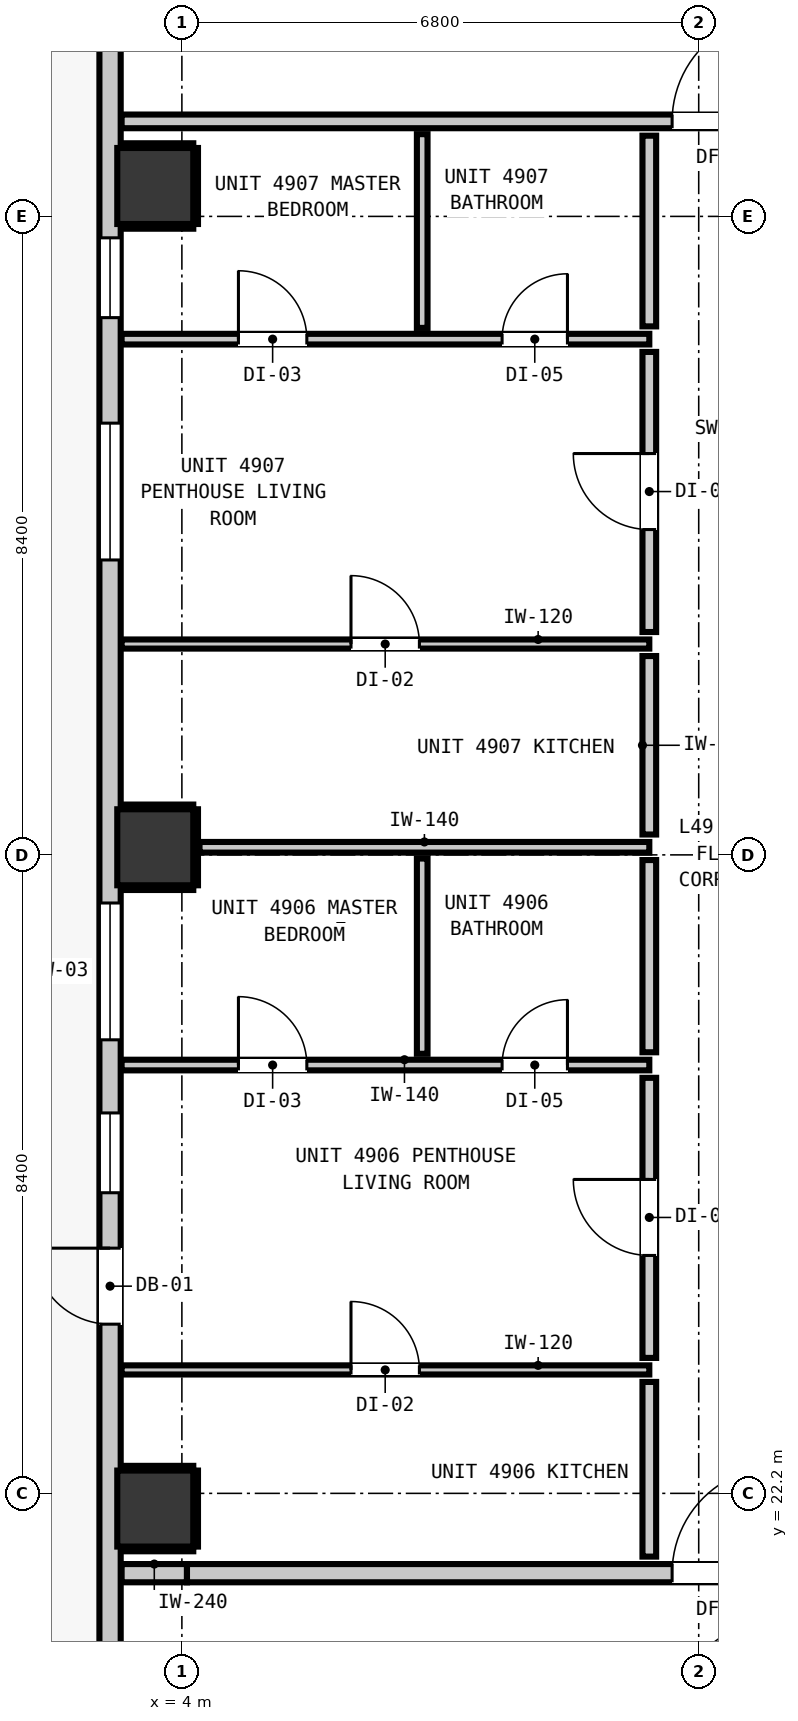
"""IFC4 building model, lengths in metres.
Left out: names, types, materials, properties, quantities, classifications, styles, units other than length and angle.
Written with IfcOpenShell. Run it as: python <this file> out.ifc"""

import sys

from ifc_helpers import new_model, si_unit, direction, frame, frame_2d, origin, origin_2d, place, context, subcontext, project, spatial, rectangle, extrude, element, fill, save


model = new_model("IFC4")
c1 = context("Model", 3, precision=1e-05, world=origin(), true_north=direction((0.0, 1.0)))
c2 = subcontext(c1, "Body", "Model", "MODEL_VIEW")
j1 = project(units=[si_unit("LENGTHUNIT", "METRE"), si_unit("PLANEANGLEUNIT", "RADIAN")], contexts=[c1])
p1 = place(None, origin())
s1 = spatial("IfcSite", under=j1, at=p1, CompositionType="ELEMENT")
p2 = place(p1, origin())
s2 = spatial("IfcBuilding", under=s1, at=p2, CompositionType="ELEMENT")
p3 = place(p2, frame((0.0, 0.0, 169.16)))
s3 = spatial("IfcBuildingStorey", under=s2, at=p3, CompositionType="ELEMENT", Elevation=169.16)
for number, where, z_axis, x_axis in (
    (1, (3.65, 22.0, 0.0), (0.0, 0.0, 1.0), (1.0, 0.0, 0.0)),
    (2, (3.65, 30.7, 0.0), (0.0, 0.0, 1.0), (1.0, 0.0, 0.0)),
    (3, (3.65, 39.4, 0.0), (0.0, 0.0, 1.0), (1.0, 0.0, 0.0)),
):
    element("IfcColumn", number, at=place(p3, frame(where, z_axis=z_axis, x_axis=x_axis)), inside=s3, PredefinedType="COLUMN", context=c2, shape_type="SweptSolid", body=[
        extrude(rectangle(XDim=1.0, YDim=1.0, at=origin_2d()), origin(), (0.0, 0.0, 1.0), 3.32),
    ])
p4 = place(p3, frame((3.055, 17.555, 0.0), z_axis=(0.0, 0.0, 1.0), x_axis=(0.0, 1.0, 0.0)))
e4 = element("IfcWall", 4, at=p4, inside=s3, PredefinedType="STANDARD", context=c2, shape_type="SweptSolid", body=[
    extrude(rectangle(XDim=32.29, YDim=0.28, at=frame_2d((16.145, 0.0))), origin(), (0.0, 0.0, 1.0), 2.96),
])
p5 = place(p4, frame((6.871, 0.0, 0.0)))
e5 = element("IfcOpeningElement", 5, at=p5, cuts=e4, PredefinedType="OPENING", context=c2, shape_type="SweptSolid", body=[
    extrude(rectangle(XDim=1.0, YDim=2.15, at=frame_2d((0.5, 1.075))), frame((0.0, 0.15, 0.0), z_axis=(0.0, -1.0, 0.0), x_axis=(1.0, 0.0, 0.0)), (0.0, 0.0, 1.0), 0.3),
])
p6 = place(p4, frame((30.753, 0.0, 0.85)))
e6 = element("IfcOpeningElement", 6, at=p6, cuts=e4, PredefinedType="OPENING", context=c2, shape_type="SweptSolid", body=[
    extrude(rectangle(XDim=1.05, YDim=1.65, at=frame_2d((0.525, 0.825))), frame((0.0, 0.15, 0.0), z_axis=(0.0, -1.0, 0.0), x_axis=(1.0, 0.0, 0.0)), (0.0, 0.0, 1.0), 0.3),
])
p7 = place(p4, frame((8.6, 0.0, 0.85)))
e7 = element("IfcOpeningElement", 7, at=p7, cuts=e4, PredefinedType="OPENING", context=c2, shape_type="SweptSolid", body=[
    extrude(rectangle(XDim=1.05, YDim=1.65, at=frame_2d((0.525, 0.825))), frame((0.0, 0.15, 0.0), z_axis=(0.0, -1.0, 0.0), x_axis=(1.0, 0.0, 0.0)), (0.0, 0.0, 1.0), 0.3),
])
p8 = place(p4, frame((10.612, 0.0, 0.85)))
e8 = element("IfcOpeningElement", 8, at=p8, cuts=e4, PredefinedType="OPENING", context=c2, shape_type="SweptSolid", body=[
    extrude(rectangle(XDim=1.8, YDim=1.9, at=frame_2d((0.9, 0.95))), frame((0.0, 0.15, 0.0), z_axis=(0.0, -1.0, 0.0), x_axis=(1.0, 0.0, 0.0)), (0.0, 0.0, 1.0), 0.3),
])
p9 = place(p4, frame((16.925, 0.0, 0.85)))
e9 = element("IfcOpeningElement", 9, at=p9, cuts=e4, PredefinedType="OPENING", context=c2, shape_type="SweptSolid", body=[
    extrude(rectangle(XDim=1.8, YDim=1.9, at=frame_2d((0.9, 0.95))), frame((0.0, 0.15, 0.0), z_axis=(0.0, -1.0, 0.0), x_axis=(1.0, 0.0, 0.0)), (0.0, 0.0, 1.0), 0.3),
])
p10 = place(p4, frame((20.113, 0.0, 0.85)))
e10 = element("IfcOpeningElement", 10, at=p10, cuts=e4, PredefinedType="OPENING", context=c2, shape_type="SweptSolid", body=[
    extrude(rectangle(XDim=1.05, YDim=1.65, at=frame_2d((0.525, 0.825))), frame((0.0, 0.15, 0.0), z_axis=(0.0, -1.0, 0.0), x_axis=(1.0, 0.0, 0.0)), (0.0, 0.0, 1.0), 0.3),
])
p11 = place(p3, frame((3.207, 21.15, 0.0), z_axis=(0.0, 0.0, 1.0), x_axis=(1.0, 0.0, 0.0)))
e11 = element("IfcWall", 11, at=p11, inside=s3, PredefinedType="PARTITIONING", context=c2, shape_type="SweptSolid", body=[
    extrude(rectangle(XDim=0.86, YDim=0.24, at=frame_2d((0.43, 0.0))), origin(), (0.0, 0.0, 1.0), 2.96),
])
p12 = place(p3, frame((4.067, 21.15, 0.0), z_axis=(0.0, 0.0, 1.0), x_axis=(1.0, 0.0, 0.0)))
e12 = element("IfcWall", 12, at=p12, inside=s3, PredefinedType="PARTITIONING", context=c2, shape_type="SweptSolid", body=[
    extrude(rectangle(XDim=8.916, YDim=0.24, at=frame_2d((4.458, 0.0))), origin(), (0.0, 0.0, 1.0), 2.445),
])
p13 = place(p12, frame((6.383, 0.0, 0.0)))
e13 = element("IfcOpeningElement", 13, at=p13, cuts=e12, PredefinedType="OPENING", context=c2, shape_type="SweptSolid", body=[
    extrude(rectangle(XDim=1.4, YDim=2.15, at=frame_2d((0.7, 1.075))), frame((0.0, 0.13, 0.0), z_axis=(0.0, -1.0, 0.0), x_axis=(1.0, 0.0, 0.0)), (0.0, 0.0, 1.0), 0.26),
])
p14 = place(p3, frame((3.207, 40.25, 0.0), z_axis=(0.0, 0.0, 1.0), x_axis=(1.0, 0.0, 0.0)))
e14 = element("IfcWall", 14, at=p14, inside=s3, PredefinedType="PARTITIONING", context=c2, shape_type="SweptSolid", body=[
    extrude(rectangle(XDim=39.386, YDim=0.18, at=frame_2d((19.693, 0.0))), origin(), (0.0, 0.0, 1.0), 2.96),
])
p15 = place(p14, frame((14.228, 0.0, 0.0)))
e15 = element("IfcOpeningElement", 15, at=p15, cuts=e14, PredefinedType="OPENING", context=c2, shape_type="SweptSolid", body=[
    extrude(rectangle(XDim=1.4, YDim=2.15, at=frame_2d((0.7, 1.075))), frame((0.0, 0.1, 0.0), z_axis=(0.0, -1.0, 0.0), x_axis=(1.0, 0.0, 0.0)), (0.0, 0.0, 1.0), 0.2),
])
p16 = place(p14, frame((7.243, 0.0, 0.0)))
e16 = element("IfcOpeningElement", 16, at=p16, cuts=e14, PredefinedType="OPENING", context=c2, shape_type="SweptSolid", body=[
    extrude(rectangle(XDim=1.4, YDim=2.15, at=frame_2d((0.7, 1.075))), frame((0.0, 0.1, 0.0), z_axis=(0.0, -1.0, 0.0), x_axis=(1.0, 0.0, 0.0)), (0.0, 0.0, 1.0), 0.2),
])
p17 = place(p14, frame((34.843, 0.0, 0.0)))
e17 = element("IfcOpeningElement", 17, at=p17, cuts=e14, PredefinedType="OPENING", context=c2, shape_type="SweptSolid", body=[
    extrude(rectangle(XDim=1.4, YDim=2.15, at=frame_2d((0.7, 1.075))), frame((0.0, 0.1, 0.0), z_axis=(0.0, -1.0, 0.0), x_axis=(1.0, 0.0, 0.0)), (0.0, 0.0, 1.0), 0.2),
])
p18 = place(p3, frame((3.207, 27.835, 0.0), z_axis=(0.0, 0.0, 1.0), x_axis=(1.0, 0.0, 0.0)))
e18 = element("IfcWall", 18, at=p18, inside=s3, PredefinedType="PARTITIONING", context=c2, shape_type="SweptSolid", body=[
    extrude(rectangle(XDim=6.943, YDim=0.14, at=frame_2d((3.471, 0.0))), origin(), (0.0, 0.0, 1.0), 2.96),
])
p19 = place(p18, frame((5.006, 0.0, 0.0)))
e19 = element("IfcOpeningElement", 19, at=p19, cuts=e18, PredefinedType="OPENING", context=c2, shape_type="SweptSolid", body=[
    extrude(rectangle(XDim=0.86, YDim=2.02, at=frame_2d((0.43, 1.01))), frame((0.0, 0.08, 0.0), z_axis=(0.0, -1.0, 0.0), x_axis=(1.0, 0.0, 0.0)), (0.0, 0.0, 1.0), 0.16),
])
p20 = place(p18, frame((1.537, 0.0, 0.0)))
e20 = element("IfcOpeningElement", 20, at=p20, cuts=e18, PredefinedType="OPENING", context=c2, shape_type="SweptSolid", body=[
    extrude(rectangle(XDim=0.9, YDim=2.1, at=frame_2d((0.45, 1.05))), frame((0.0, 0.08, 0.0), z_axis=(0.0, -1.0, 0.0), x_axis=(1.0, 0.0, 0.0)), (0.0, 0.0, 1.0), 0.16),
])
p21 = place(p3, frame((4.232, 30.7, 0.0), z_axis=(0.0, 0.0, 1.0), x_axis=(1.0, 0.0, 0.0)))
e21 = element("IfcWall", 21, at=p21, inside=s3, PredefinedType="PARTITIONING", context=c2, shape_type="SweptSolid", body=[
    extrude(rectangle(XDim=5.918, YDim=0.14, at=frame_2d((2.959, 0.0))), origin(), (0.0, 0.0, 1.0), 2.195),
])
p22 = place(p3, frame((3.207, 37.385, 0.0), z_axis=(0.0, 0.0, 1.0), x_axis=(1.0, 0.0, 0.0)))
e22 = element("IfcWall", 22, at=p22, inside=s3, PredefinedType="PARTITIONING", context=c2, shape_type="SweptSolid", body=[
    extrude(rectangle(XDim=6.943, YDim=0.14, at=frame_2d((3.471, 0.0))), origin(), (0.0, 0.0, 1.0), 2.96),
])
p23 = place(p22, frame((5.006, 0.0, 0.0)))
e23 = element("IfcOpeningElement", 23, at=p23, cuts=e22, PredefinedType="OPENING", context=c2, shape_type="SweptSolid", body=[
    extrude(rectangle(XDim=0.86, YDim=2.02, at=frame_2d((0.43, 1.01))), frame((0.0, 0.08, 0.0), z_axis=(0.0, -1.0, 0.0), x_axis=(1.0, 0.0, 0.0)), (0.0, 0.0, 1.0), 0.16),
])
p24 = place(p22, frame((1.537, 0.0, 0.0)))
e24 = element("IfcOpeningElement", 24, at=p24, cuts=e22, PredefinedType="OPENING", context=c2, shape_type="SweptSolid", body=[
    extrude(rectangle(XDim=0.9, YDim=2.1, at=frame_2d((0.45, 1.05))), frame((0.0, 0.08, 0.0), z_axis=(0.0, -1.0, 0.0), x_axis=(1.0, 0.0, 0.0)), (0.0, 0.0, 1.0), 0.16),
])
p25 = place(p3, frame((3.207, 23.824, 0.0), z_axis=(0.0, 0.0, 1.0), x_axis=(1.0, 0.0, 0.0)))
e25 = element("IfcWall", 25, at=p25, inside=s3, PredefinedType="PARTITIONING", context=c2, shape_type="SweptSolid", body=[
    extrude(rectangle(XDim=6.943, YDim=0.12, at=frame_2d((3.471, 0.0))), origin(), (0.0, 0.0, 1.0), 2.96),
])
p26 = place(p25, frame((3.018, 0.0, 0.0)))
e26 = element("IfcOpeningElement", 26, at=p26, cuts=e25, PredefinedType="OPENING", context=c2, shape_type="SweptSolid", body=[
    extrude(rectangle(XDim=0.9, YDim=2.1, at=frame_2d((0.45, 1.05))), frame((0.0, 0.07, 0.0), z_axis=(0.0, -1.0, 0.0), x_axis=(1.0, 0.0, 0.0)), (0.0, 0.0, 1.0), 0.14),
])
p27 = place(p3, frame((3.207, 33.374, 0.0), z_axis=(0.0, 0.0, 1.0), x_axis=(1.0, 0.0, 0.0)))
e27 = element("IfcWall", 27, at=p27, inside=s3, PredefinedType="PARTITIONING", context=c2, shape_type="SweptSolid", body=[
    extrude(rectangle(XDim=6.943, YDim=0.12, at=frame_2d((3.471, 0.0))), origin(), (0.0, 0.0, 1.0), 2.96),
])
p28 = place(p27, frame((3.018, 0.0, 0.0)))
e28 = element("IfcOpeningElement", 28, at=p28, cuts=e27, PredefinedType="OPENING", context=c2, shape_type="SweptSolid", body=[
    extrude(rectangle(XDim=0.9, YDim=2.1, at=frame_2d((0.45, 1.05))), frame((0.0, 0.07, 0.0), z_axis=(0.0, -1.0, 0.0), x_axis=(1.0, 0.0, 0.0)), (0.0, 0.0, 1.0), 0.14),
])
p29 = place(p3, frame((10.15, 21.368, 0.0), z_axis=(0.0, 0.0, 1.0), x_axis=(0.0, 1.0, 0.0)))
e29 = element("IfcWall", 29, at=p29, inside=s3, PredefinedType="PARTITIONING", context=c2, shape_type="SweptSolid", body=[
    extrude(rectangle(XDim=2.298, YDim=0.18, at=frame_2d((1.149, 0.0))), origin(), (0.0, 0.0, 1.0), 2.96),
])
p30 = place(p3, frame((10.15, 23.982, 0.0), z_axis=(0.0, 0.0, 1.0), x_axis=(0.0, 1.0, 0.0)))
e30 = element("IfcWall", 30, at=p30, inside=s3, PredefinedType="PARTITIONING", context=c2, shape_type="SweptSolid", body=[
    extrude(rectangle(XDim=3.685, YDim=0.18, at=frame_2d((1.843, 0.0))), origin(), (0.0, 0.0, 1.0), 2.96),
])
p31 = place(p30, frame((1.348, 0.0, 0.0)))
e31 = element("IfcOpeningElement", 31, at=p31, cuts=e30, PredefinedType="OPENING", context=c2, shape_type="SweptSolid", body=[
    extrude(rectangle(XDim=1.0, YDim=2.15, at=frame_2d((0.5, 1.075))), frame((0.0, 0.1, 0.0), z_axis=(0.0, -1.0, 0.0), x_axis=(1.0, 0.0, 0.0)), (0.0, 0.0, 1.0), 0.2),
])
p32 = place(p3, frame((10.15, 28.003, 0.0), z_axis=(0.0, 0.0, 1.0), x_axis=(0.0, 1.0, 0.0)))
e32 = element("IfcWall", 32, at=p32, inside=s3, PredefinedType="PARTITIONING", context=c2, shape_type="SweptSolid", body=[
    extrude(rectangle(XDim=2.529, YDim=0.18, at=frame_2d((1.265, 0.0))), origin(), (0.0, 0.0, 1.0), 2.96),
])
p33 = place(p3, frame((10.15, 30.868, 0.0), z_axis=(0.0, 0.0, 1.0), x_axis=(0.0, 1.0, 0.0)))
e33 = element("IfcWall", 33, at=p33, inside=s3, PredefinedType="PARTITIONING", context=c2, shape_type="SweptSolid", body=[
    extrude(rectangle(XDim=2.348, YDim=0.18, at=frame_2d((1.174, 0.0))), origin(), (0.0, 0.0, 1.0), 2.96),
])
p34 = place(p3, frame((10.15, 33.532, 0.0), z_axis=(0.0, 0.0, 1.0), x_axis=(0.0, 1.0, 0.0)))
e34 = element("IfcWall", 34, at=p34, inside=s3, PredefinedType="PARTITIONING", context=c2, shape_type="SweptSolid", body=[
    extrude(rectangle(XDim=3.685, YDim=0.18, at=frame_2d((1.843, 0.0))), origin(), (0.0, 0.0, 1.0), 2.96),
])
p35 = place(p34, frame((1.348, 0.0, 0.0)))
e35 = element("IfcOpeningElement", 35, at=p35, cuts=e34, PredefinedType="OPENING", context=c2, shape_type="SweptSolid", body=[
    extrude(rectangle(XDim=1.0, YDim=2.15, at=frame_2d((0.5, 1.075))), frame((0.0, 0.1, 0.0), z_axis=(0.0, -1.0, 0.0), x_axis=(1.0, 0.0, 0.0)), (0.0, 0.0, 1.0), 0.2),
])
p36 = place(p3, frame((10.15, 37.553, 0.0), z_axis=(0.0, 0.0, 1.0), x_axis=(0.0, 1.0, 0.0)))
e36 = element("IfcWall", 36, at=p36, inside=s3, PredefinedType="PARTITIONING", context=c2, shape_type="SweptSolid", body=[
    extrude(rectangle(XDim=2.509, YDim=0.18, at=frame_2d((1.254, 0.0))), origin(), (0.0, 0.0, 1.0), 2.96),
])
p37 = place(p3, frame((7.162, 27.983, 0.0), z_axis=(0.0, 0.0, 1.0), x_axis=(0.0, 1.0, 0.0)))
e37 = element("IfcWall", 37, at=p37, inside=s3, PredefinedType="PARTITIONING", context=c2, shape_type="SweptSolid", body=[
    extrude(rectangle(XDim=2.569, YDim=0.14, at=frame_2d((1.285, 0.0))), origin(), (0.0, 0.0, 1.0), 2.96),
])
p38 = place(p3, frame((7.162, 37.533, 0.0), z_axis=(0.0, 0.0, 1.0), x_axis=(0.0, 1.0, 0.0)))
e38 = element("IfcWall", 38, at=p38, inside=s3, PredefinedType="PARTITIONING", context=c2, shape_type="SweptSolid", body=[
    extrude(rectangle(XDim=2.549, YDim=0.14, at=frame_2d((1.274, 0.0))), origin(), (0.0, 0.0, 1.0), 2.96),
])
for number, where, z_axis, x_axis in (
    (39, (3.21, 21.468, 0.0), (0.0, 0.0, 1.0), (1.0, 0.0, 0.0)),
    (40, (3.21, 22.532, 0.0), (0.0, 0.0, 1.0), (1.0, 0.0, 0.0)),
):
    element("IfcWall", number, at=place(p3, frame(where, z_axis=z_axis, x_axis=x_axis)), inside=s3, PredefinedType="PARTITIONING", context=c2, shape_type="SweptSolid", body=[
        extrude(rectangle(XDim=0.94, YDim=0.06, at=frame_2d((0.47, 0.0))), origin(), (0.0, 0.0, 1.0), 1.45),
    ])
p39 = place(p3, frame((4.182, 21.5, 0.0), z_axis=(0.0, 0.0, 1.0), x_axis=(0.0, 1.0, 0.0)))
e41 = element("IfcWall", 41, at=p39, inside=s3, PredefinedType="PARTITIONING", context=c2, shape_type="SweptSolid", body=[
    extrude(rectangle(XDim=1.0, YDim=0.06, at=frame_2d((0.5, 0.0))), origin(), (0.0, 0.0, 1.0), 1.45),
])
for number, where, z_axis, x_axis in (
    (42, (3.21, 30.168, 0.0), (0.0, 0.0, 1.0), (1.0, 0.0, 0.0)),
    (43, (3.21, 31.232, 0.0), (0.0, 0.0, 1.0), (1.0, 0.0, 0.0)),
):
    element("IfcWall", number, at=place(p3, frame(where, z_axis=z_axis, x_axis=x_axis)), inside=s3, PredefinedType="PARTITIONING", context=c2, shape_type="SweptSolid", body=[
        extrude(rectangle(XDim=0.94, YDim=0.06, at=frame_2d((0.47, 0.0))), origin(), (0.0, 0.0, 1.0), 1.45),
    ])
p40 = place(p3, frame((4.182, 30.2, 0.0), z_axis=(0.0, 0.0, 1.0), x_axis=(0.0, 1.0, 0.0)))
e44 = element("IfcWall", 44, at=p40, inside=s3, PredefinedType="PARTITIONING", context=c2, shape_type="SweptSolid", body=[
    extrude(rectangle(XDim=1.0, YDim=0.06, at=frame_2d((0.5, 0.0))), origin(), (0.0, 0.0, 1.0), 1.45),
])
for number, where, z_axis, x_axis in (
    (45, (3.21, 38.868, 0.0), (0.0, 0.0, 1.0), (1.0, 0.0, 0.0)),
    (46, (3.21, 39.932, 0.0), (0.0, 0.0, 1.0), (1.0, 0.0, 0.0)),
):
    element("IfcWall", number, at=place(p3, frame(where, z_axis=z_axis, x_axis=x_axis)), inside=s3, PredefinedType="PARTITIONING", context=c2, shape_type="SweptSolid", body=[
        extrude(rectangle(XDim=0.94, YDim=0.06, at=frame_2d((0.47, 0.0))), origin(), (0.0, 0.0, 1.0), 1.45),
    ])
p41 = place(p3, frame((4.182, 38.9, 0.0), z_axis=(0.0, 0.0, 1.0), x_axis=(0.0, 1.0, 0.0)))
e47 = element("IfcWall", 47, at=p41, inside=s3, PredefinedType="PARTITIONING", context=c2, shape_type="SweptSolid", body=[
    extrude(rectangle(XDim=1.0, YDim=0.06, at=frame_2d((0.5, 0.0))), origin(), (0.0, 0.0, 1.0), 1.45),
])
p42 = place(p5, origin())
e48 = element("IfcDoor", 48, at=p42, inside=s3, OperationType="SINGLE_SWING_RIGHT", PredefinedType="DOOR", context=c2, shape_type="SweptSolid", body=[
    extrude(rectangle(XDim=1.0, YDim=2.15, at=frame_2d((0.5, 1.075))), frame((0.0, 0.025, 0.0), z_axis=(0.0, -1.0, 0.0), x_axis=(1.0, 0.0, 0.0)), (0.0, 0.0, 1.0), 0.05),
])
fill(e5, e48)
p43 = place(p7, origin())
e49 = element("IfcWindow", 49, at=p43, inside=s3, PartitioningType="SINGLE_PANEL", PredefinedType="WINDOW", context=c2, shape_type="SweptSolid", body=[
    extrude(rectangle(XDim=1.05, YDim=1.65, at=frame_2d((0.525, 0.825))), frame((0.0, 0.03, 0.0), z_axis=(0.0, -1.0, 0.0), x_axis=(1.0, 0.0, 0.0)), (0.0, 0.0, 1.0), 0.06),
])
fill(e7, e49)
p44 = place(p8, origin())
e50 = element("IfcWindow", 50, at=p44, inside=s3, PartitioningType="SINGLE_PANEL", PredefinedType="WINDOW", context=c2, shape_type="SweptSolid", body=[
    extrude(rectangle(XDim=1.8, YDim=1.9, at=frame_2d((0.9, 0.95))), frame((0.0, 0.03, 0.0), z_axis=(0.0, -1.0, 0.0), x_axis=(1.0, 0.0, 0.0)), (0.0, 0.0, 1.0), 0.06),
])
fill(e8, e50)
p45 = place(p9, origin())
e51 = element("IfcWindow", 51, at=p45, inside=s3, PartitioningType="SINGLE_PANEL", PredefinedType="WINDOW", context=c2, shape_type="SweptSolid", body=[
    extrude(rectangle(XDim=1.8, YDim=1.9, at=frame_2d((0.9, 0.95))), frame((0.0, 0.03, 0.0), z_axis=(0.0, -1.0, 0.0), x_axis=(1.0, 0.0, 0.0)), (0.0, 0.0, 1.0), 0.06),
])
fill(e9, e51)
p46 = place(p10, origin())
e52 = element("IfcWindow", 52, at=p46, inside=s3, PartitioningType="SINGLE_PANEL", PredefinedType="WINDOW", context=c2, shape_type="SweptSolid", body=[
    extrude(rectangle(XDim=1.05, YDim=1.65, at=frame_2d((0.525, 0.825))), frame((0.0, 0.03, 0.0), z_axis=(0.0, -1.0, 0.0), x_axis=(1.0, 0.0, 0.0)), (0.0, 0.0, 1.0), 0.06),
])
fill(e10, e52)
p47 = place(p13, origin())
e53 = element("IfcDoor", 53, at=p47, inside=s3, OperationType="SINGLE_SWING_RIGHT", PredefinedType="DOOR", context=c2, shape_type="SweptSolid", body=[
    extrude(rectangle(XDim=1.4, YDim=2.15, at=frame_2d((0.7, 1.075))), frame((0.0, 0.025, 0.0), z_axis=(0.0, -1.0, 0.0), x_axis=(1.0, 0.0, 0.0)), (0.0, 0.0, 1.0), 0.05),
])
fill(e13, e53)
p48 = place(p16, origin())
e54 = element("IfcDoor", 54, at=p48, inside=s3, OperationType="SINGLE_SWING_RIGHT", PredefinedType="DOOR", context=c2, shape_type="SweptSolid", body=[
    extrude(rectangle(XDim=1.4, YDim=2.15, at=frame_2d((0.7, 1.075))), frame((0.0, 0.025, 0.0), z_axis=(0.0, -1.0, 0.0), x_axis=(1.0, 0.0, 0.0)), (0.0, 0.0, 1.0), 0.05),
])
fill(e16, e54)
p49 = place(p31, origin())
e55 = element("IfcDoor", 55, at=p49, inside=s3, OperationType="SINGLE_SWING_RIGHT", PredefinedType="DOOR", context=c2, shape_type="SweptSolid", body=[
    extrude(rectangle(XDim=1.0, YDim=2.15, at=frame_2d((0.5, 1.075))), frame((0.0, 0.025, 0.0), z_axis=(0.0, -1.0, 0.0), x_axis=(1.0, 0.0, 0.0)), (0.0, 0.0, 1.0), 0.05),
])
fill(e31, e55)
p50 = place(p26, origin())
e56 = element("IfcDoor", 56, at=p50, inside=s3, OperationType="SINGLE_SWING_LEFT", PredefinedType="DOOR", context=c2, shape_type="SweptSolid", body=[
    extrude(rectangle(XDim=0.9, YDim=2.1, at=frame_2d((0.45, 1.05))), frame((0.0, 0.025, 0.0), z_axis=(0.0, -1.0, 0.0), x_axis=(1.0, 0.0, 0.0)), (0.0, 0.0, 1.0), 0.05),
])
fill(e26, e56)
p51 = place(p19, origin())
e57 = element("IfcDoor", 57, at=p51, inside=s3, OperationType="SINGLE_SWING_RIGHT", PredefinedType="DOOR", context=c2, shape_type="SweptSolid", body=[
    extrude(rectangle(XDim=0.86, YDim=2.02, at=frame_2d((0.43, 1.01))), frame((0.0, 0.025, 0.0), z_axis=(0.0, -1.0, 0.0), x_axis=(1.0, 0.0, 0.0)), (0.0, 0.0, 1.0), 0.05),
])
fill(e19, e57)
p52 = place(p20, origin())
e58 = element("IfcDoor", 58, at=p52, inside=s3, OperationType="SINGLE_SWING_LEFT", PredefinedType="DOOR", context=c2, shape_type="SweptSolid", body=[
    extrude(rectangle(XDim=0.9, YDim=2.1, at=frame_2d((0.45, 1.05))), frame((0.0, 0.025, 0.0), z_axis=(0.0, -1.0, 0.0), x_axis=(1.0, 0.0, 0.0)), (0.0, 0.0, 1.0), 0.05),
])
fill(e20, e58)
p53 = place(p35, origin())
e59 = element("IfcDoor", 59, at=p53, inside=s3, OperationType="SINGLE_SWING_RIGHT", PredefinedType="DOOR", context=c2, shape_type="SweptSolid", body=[
    extrude(rectangle(XDim=1.0, YDim=2.15, at=frame_2d((0.5, 1.075))), frame((0.0, 0.025, 0.0), z_axis=(0.0, -1.0, 0.0), x_axis=(1.0, 0.0, 0.0)), (0.0, 0.0, 1.0), 0.05),
])
fill(e35, e59)
p54 = place(p28, origin())
e60 = element("IfcDoor", 60, at=p54, inside=s3, OperationType="SINGLE_SWING_LEFT", PredefinedType="DOOR", context=c2, shape_type="SweptSolid", body=[
    extrude(rectangle(XDim=0.9, YDim=2.1, at=frame_2d((0.45, 1.05))), frame((0.0, 0.025, 0.0), z_axis=(0.0, -1.0, 0.0), x_axis=(1.0, 0.0, 0.0)), (0.0, 0.0, 1.0), 0.05),
])
fill(e28, e60)
p55 = place(p23, origin())
e61 = element("IfcDoor", 61, at=p55, inside=s3, OperationType="SINGLE_SWING_RIGHT", PredefinedType="DOOR", context=c2, shape_type="SweptSolid", body=[
    extrude(rectangle(XDim=0.86, YDim=2.02, at=frame_2d((0.43, 1.01))), frame((0.0, 0.025, 0.0), z_axis=(0.0, -1.0, 0.0), x_axis=(1.0, 0.0, 0.0)), (0.0, 0.0, 1.0), 0.05),
])
fill(e23, e61)
p56 = place(p24, origin())
e62 = element("IfcDoor", 62, at=p56, inside=s3, OperationType="SINGLE_SWING_LEFT", PredefinedType="DOOR", context=c2, shape_type="SweptSolid", body=[
    extrude(rectangle(XDim=0.9, YDim=2.1, at=frame_2d((0.45, 1.05))), frame((0.0, 0.025, 0.0), z_axis=(0.0, -1.0, 0.0), x_axis=(1.0, 0.0, 0.0)), (0.0, 0.0, 1.0), 0.05),
])
fill(e24, e62)
save(model, sys.argv[1])
